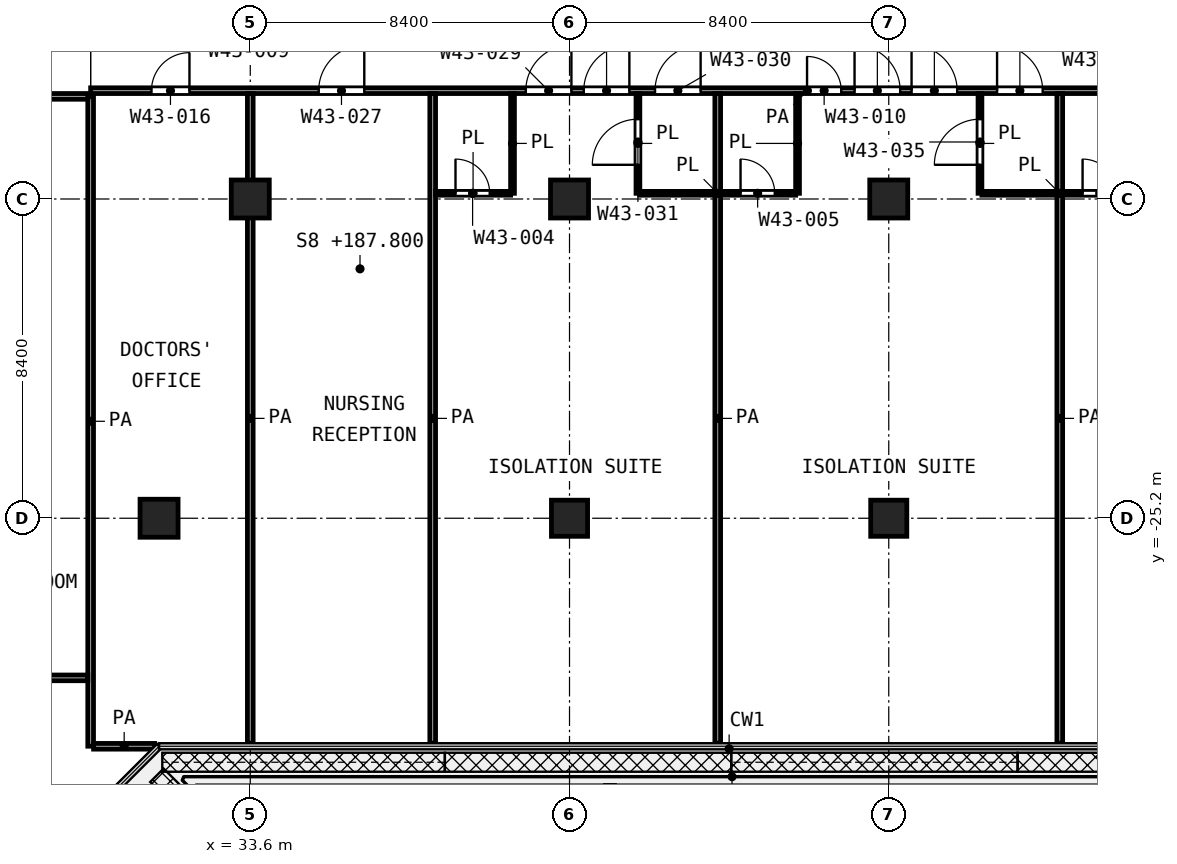
"""IFC4 building model, lengths in metres.
Left out: names, types, materials, properties, quantities, classifications, styles, units other than length and angle.
Written with IfcOpenShell. Run it as: python <this file> out.ifc"""

import sys

from ifc_helpers import new_model, si_unit, direction, frame, frame_2d, origin, origin_2d, place, context, subcontext, project, spatial, rectangle, extrude, element, fill, save


model = new_model("IFC4")
c1 = context("Model", 3, precision=1e-05, world=origin(), true_north=direction((0.0, 1.0)))
c2 = subcontext(c1, "Body", "Model", "MODEL_VIEW")
j1 = project(units=[si_unit("LENGTHUNIT", "METRE"), si_unit("PLANEANGLEUNIT", "RADIAN")], contexts=[c1])
p1 = place(None, origin())
s1 = spatial("IfcSite", under=j1, at=p1, CompositionType="ELEMENT")
p2 = place(p1, origin())
s2 = spatial("IfcBuilding", under=s1, at=p2, CompositionType="ELEMENT")
p3 = place(p2, frame((0.0, 0.0, 187.8)))
s3 = spatial("IfcBuildingStorey", under=s2, at=p3, CompositionType="ELEMENT", Elevation=187.8)
for number, where, z_axis, x_axis in (
    (1, (33.6, -16.8, 0.0), (0.0, 0.0, 1.0), (1.0, 0.0, 0.0)),
    (2, (42.0, -16.8, 0.0), (0.0, 0.0, 1.0), (1.0, 0.0, 0.0)),
    (3, (50.4, -16.8, 0.0), (0.0, 0.0, 1.0), (1.0, 0.0, 0.0)),
    (4, (31.2, -25.2, 0.0), (0.0, 0.0, 1.0), (1.0, 0.0, 0.0)),
):
    element("IfcColumn", number, at=place(p3, frame(where, z_axis=z_axis, x_axis=x_axis)), inside=s3, PredefinedType="COLUMN", context=c2, shape_type="SweptSolid", body=[
        extrude(rectangle(XDim=1.0, YDim=1.0, at=origin_2d()), origin(), (0.0, 0.0, 1.0), 4.2),
    ])
for number, where, z_axis, x_axis in (
    (5, (42.0, -25.2, 0.0), (0.0, 0.0, 1.0), (1.0, 0.0, 0.0)),
    (6, (50.4, -25.2, 0.0), (0.0, 0.0, 1.0), (1.0, 0.0, 0.0)),
):
    element("IfcColumn", number, at=place(p3, frame(where, z_axis=z_axis, x_axis=x_axis)), inside=s3, PredefinedType="COLUMN", context=c2, shape_type="SweptSolid", body=[
        extrude(rectangle(XDim=0.95, YDim=0.95, at=origin_2d()), origin(), (0.0, 0.0, 1.0), 4.2),
    ])
p4 = place(p3, frame((38.475, -16.65, 0.0), z_axis=(0.0, 0.0, 1.0), x_axis=(1.0, 0.0, 0.0)))
e7 = element("IfcWall", 7, at=p4, inside=s3, PredefinedType="PARTITIONING", context=c2, shape_type="SweptSolid", body=[
    extrude(rectangle(XDim=1.975, YDim=0.1, at=frame_2d((0.987, 0.0))), origin(), (0.0, 0.0, 1.0), 3.6),
])
p5 = place(p4, frame((0.525, 0.0, 0.0)))
e8 = element("IfcOpeningElement", 8, at=p5, cuts=e7, PredefinedType="OPENING", context=c2, shape_type="SweptSolid", body=[
    extrude(rectangle(XDim=0.9, YDim=2.1, at=frame_2d((0.45, 1.05))), frame((0.0, 0.06, 0.0), z_axis=(0.0, -1.0, 0.0), x_axis=(1.0, 0.0, 0.0)), (0.0, 0.0, 1.0), 0.12),
])
p6 = place(p3, frame((43.85, -16.65, 0.0), z_axis=(0.0, 0.0, 1.0), x_axis=(1.0, 0.0, 0.0)))
e9 = element("IfcWall", 9, at=p6, inside=s3, PredefinedType="PARTITIONING", context=c2, shape_type="SweptSolid", body=[
    extrude(rectangle(XDim=4.1, YDim=0.1, at=frame_2d((2.05, 0.0))), origin(), (0.0, 0.0, 1.0), 3.6),
])
p7 = place(p6, frame((2.65, 0.0, 0.0)))
e10 = element("IfcOpeningElement", 10, at=p7, cuts=e9, PredefinedType="OPENING", context=c2, shape_type="SweptSolid", body=[
    extrude(rectangle(XDim=0.9, YDim=2.1, at=frame_2d((0.45, 1.05))), frame((0.0, 0.06, 0.0), z_axis=(0.0, -1.0, 0.0), x_axis=(1.0, 0.0, 0.0)), (0.0, 0.0, 1.0), 0.12),
])
p8 = place(p3, frame((52.85, -16.65, 0.0), z_axis=(0.0, 0.0, 1.0), x_axis=(1.0, 0.0, 0.0)))
e11 = element("IfcWall", 11, at=p8, inside=s3, PredefinedType="PARTITIONING", context=c2, shape_type="SweptSolid", body=[
    extrude(rectangle(XDim=4.1, YDim=0.1, at=frame_2d((2.05, 0.0))), origin(), (0.0, 0.0, 1.0), 3.6),
])
p9 = place(p8, frame((2.65, 0.0, 0.0)))
e12 = element("IfcOpeningElement", 12, at=p9, cuts=e11, PredefinedType="OPENING", context=c2, shape_type="SweptSolid", body=[
    extrude(rectangle(XDim=0.9, YDim=2.1, at=frame_2d((0.45, 1.05))), frame((0.0, 0.06, 0.0), z_axis=(0.0, -1.0, 0.0), x_axis=(1.0, 0.0, 0.0)), (0.0, 0.0, 1.0), 0.12),
])
p10 = place(p3, frame((40.5, -16.65, 0.0), z_axis=(0.0, 0.0, 1.0), x_axis=(0.0, 1.0, 0.0)))
e13 = element("IfcWall", 13, at=p10, inside=s3, PredefinedType="PARTITIONING", context=c2, shape_type="SweptSolid", body=[
    extrude(rectangle(XDim=2.625, YDim=0.1, at=frame_2d((1.312, 0.0))), origin(), (0.0, 0.0, 1.0), 3.6),
])
p11 = place(p3, frame((43.8, -16.65, 0.0), z_axis=(0.0, 0.0, 1.0), x_axis=(0.0, 1.0, 0.0)))
e14 = element("IfcWall", 14, at=p11, inside=s3, PredefinedType="PARTITIONING", context=c2, shape_type="SweptSolid", body=[
    extrude(rectangle(XDim=2.625, YDim=0.1, at=frame_2d((1.312, 0.0))), origin(), (0.0, 0.0, 1.0), 3.6),
])
p12 = place(p11, frame((0.75, 0.0, 0.0)))
e15 = element("IfcOpeningElement", 15, at=p12, cuts=e14, PredefinedType="OPENING", context=c2, shape_type="SweptSolid", body=[
    extrude(rectangle(XDim=1.2, YDim=2.1, at=frame_2d((0.6, 1.05))), frame((0.0, 0.06, 0.0), z_axis=(0.0, -1.0, 0.0), x_axis=(1.0, 0.0, 0.0)), (0.0, 0.0, 1.0), 0.12),
])
p13 = place(p3, frame((48.0, -16.65, 0.0), z_axis=(0.0, 0.0, 1.0), x_axis=(0.0, 1.0, 0.0)))
e16 = element("IfcWall", 16, at=p13, inside=s3, PredefinedType="PARTITIONING", context=c2, shape_type="SweptSolid", body=[
    extrude(rectangle(XDim=2.625, YDim=0.1, at=frame_2d((1.312, 0.0))), origin(), (0.0, 0.0, 1.0), 3.6),
])
p14 = place(p3, frame((52.8, -16.65, 0.0), z_axis=(0.0, 0.0, 1.0), x_axis=(0.0, 1.0, 0.0)))
e17 = element("IfcWall", 17, at=p14, inside=s3, PredefinedType="PARTITIONING", context=c2, shape_type="SweptSolid", body=[
    extrude(rectangle(XDim=2.625, YDim=0.1, at=frame_2d((1.312, 0.0))), origin(), (0.0, 0.0, 1.0), 3.6),
])
p15 = place(p14, frame((0.75, 0.0, 0.0)))
e18 = element("IfcOpeningElement", 18, at=p15, cuts=e17, PredefinedType="OPENING", context=c2, shape_type="SweptSolid", body=[
    extrude(rectangle(XDim=1.2, YDim=2.1, at=frame_2d((0.6, 1.05))), frame((0.0, 0.06, 0.0), z_axis=(0.0, -1.0, 0.0), x_axis=(1.0, 0.0, 0.0)), (0.0, 0.0, 1.0), 0.12),
])
p16 = place(p3, frame((29.477, -31.2, 0.0), z_axis=(0.0, 0.0, 1.0), x_axis=(1.0, 0.0, 0.0)))
e19 = element("IfcWall", 19, at=p16, inside=s3, PredefinedType="PARTITIONING", context=c2, shape_type="SweptSolid", body=[
    extrude(rectangle(XDim=1.61, YDim=0.15, at=frame_2d((0.805, 0.0))), origin(), (0.0, 0.0, 1.0), 3.6),
])
p17 = place(p3, frame((14.175, -29.4, 0.0), z_axis=(0.0, 0.0, 1.0), x_axis=(1.0, 0.0, 0.0)))
e20 = element("IfcWall", 20, at=p17, inside=s3, PredefinedType="PARTITIONING", context=c2, shape_type="SweptSolid", body=[
    extrude(rectangle(XDim=15.15, YDim=0.15, at=frame_2d((7.575, 0.0))), origin(), (0.0, 0.0, 1.0), 3.6),
])
p18 = place(p3, frame((24.9, -14.1, 0.0), z_axis=(0.0, 0.0, 1.0), x_axis=(1.0, 0.0, 0.0)))
e21 = element("IfcWall", 21, at=p18, inside=s3, PredefinedType="PARTITIONING", context=c2, shape_type="SweptSolid", body=[
    extrude(rectangle(XDim=4.425, YDim=0.15, at=frame_2d((2.212, 0.0))), origin(), (0.0, 0.0, 1.0), 3.6),
])
p19 = place(p18, frame((1.65, 0.0, 0.0)))
e22 = element("IfcOpeningElement", 22, at=p19, cuts=e21, PredefinedType="OPENING", context=c2, shape_type="SweptSolid", body=[
    extrude(rectangle(XDim=1.5, YDim=2.1, at=frame_2d((0.75, 1.05))), frame((0.0, 0.085, 0.0), z_axis=(0.0, -1.0, 0.0), x_axis=(1.0, 0.0, 0.0)), (0.0, 0.0, 1.0), 0.17),
])
p20 = place(p3, frame((29.4, -13.95, 0.0), z_axis=(0.0, 0.0, 1.0), x_axis=(1.0, 0.0, 0.0)))
e23 = element("IfcWall", 23, at=p20, inside=s3, PredefinedType="PARTITIONING", context=c2, shape_type="SweptSolid", body=[
    extrude(rectangle(XDim=37.72, YDim=0.15, at=frame_2d((18.86, 0.0))), origin(), (0.0, 0.0, 1.0), 3.6),
])
p21 = place(p20, frame((1.6, 0.0, 0.0)))
e24 = element("IfcOpeningElement", 24, at=p21, cuts=e23, PredefinedType="OPENING", context=c2, shape_type="SweptSolid", body=[
    extrude(rectangle(XDim=1.0, YDim=2.1, at=frame_2d((0.5, 1.05))), frame((0.0, 0.085, 0.0), z_axis=(0.0, -1.0, 0.0), x_axis=(1.0, 0.0, 0.0)), (0.0, 0.0, 1.0), 0.17),
])
p22 = place(p20, frame((6.0, 0.0, 0.0)))
e25 = element("IfcOpeningElement", 25, at=p22, cuts=e23, PredefinedType="OPENING", context=c2, shape_type="SweptSolid", body=[
    extrude(rectangle(XDim=1.2, YDim=2.1, at=frame_2d((0.6, 1.05))), frame((0.0, 0.085, 0.0), z_axis=(0.0, -1.0, 0.0), x_axis=(1.0, 0.0, 0.0)), (0.0, 0.0, 1.0), 0.17),
])
p23 = place(p20, frame((12.975, 0.0, 0.0)))
e26 = element("IfcOpeningElement", 26, at=p23, cuts=e23, PredefinedType="OPENING", context=c2, shape_type="SweptSolid", body=[
    extrude(rectangle(XDim=1.2, YDim=2.1, at=frame_2d((0.6, 1.05))), frame((0.0, 0.085, 0.0), z_axis=(0.0, -1.0, 0.0), x_axis=(1.0, 0.0, 0.0)), (0.0, 0.0, 1.0), 0.17),
])
p24 = place(p20, frame((11.45, 0.0, 0.0)))
e27 = element("IfcOpeningElement", 27, at=p24, cuts=e23, PredefinedType="OPENING", context=c2, shape_type="SweptSolid", body=[
    extrude(rectangle(XDim=1.2, YDim=2.1, at=frame_2d((0.6, 1.05))), frame((0.0, 0.085, 0.0), z_axis=(0.0, -1.0, 0.0), x_axis=(1.0, 0.0, 0.0)), (0.0, 0.0, 1.0), 0.17),
])
p25 = place(p20, frame((14.85, 0.0, 0.0)))
e28 = element("IfcOpeningElement", 28, at=p25, cuts=e23, PredefinedType="OPENING", context=c2, shape_type="SweptSolid", body=[
    extrude(rectangle(XDim=1.2, YDim=2.1, at=frame_2d((0.6, 1.05))), frame((0.0, 0.085, 0.0), z_axis=(0.0, -1.0, 0.0), x_axis=(1.0, 0.0, 0.0)), (0.0, 0.0, 1.0), 0.17),
])
p26 = place(p20, frame((21.6, 0.0, 0.0)))
e29 = element("IfcOpeningElement", 29, at=p26, cuts=e23, PredefinedType="OPENING", context=c2, shape_type="SweptSolid", body=[
    extrude(rectangle(XDim=1.2, YDim=2.1, at=frame_2d((0.6, 1.05))), frame((0.0, 0.085, 0.0), z_axis=(0.0, -1.0, 0.0), x_axis=(1.0, 0.0, 0.0)), (0.0, 0.0, 1.0), 0.17),
])
p27 = place(p20, frame((20.1, 0.0, 0.0)))
e30 = element("IfcOpeningElement", 30, at=p27, cuts=e23, PredefinedType="OPENING", context=c2, shape_type="SweptSolid", body=[
    extrude(rectangle(XDim=1.2, YDim=2.1, at=frame_2d((0.6, 1.05))), frame((0.0, 0.085, 0.0), z_axis=(0.0, -1.0, 0.0), x_axis=(1.0, 0.0, 0.0)), (0.0, 0.0, 1.0), 0.17),
])
p28 = place(p20, frame((18.85, 0.0, 0.0)))
e31 = element("IfcOpeningElement", 31, at=p28, cuts=e23, PredefinedType="OPENING", context=c2, shape_type="SweptSolid", body=[
    extrude(rectangle(XDim=0.9, YDim=2.1, at=frame_2d((0.45, 1.05))), frame((0.0, 0.085, 0.0), z_axis=(0.0, -1.0, 0.0), x_axis=(1.0, 0.0, 0.0)), (0.0, 0.0, 1.0), 0.17),
])
p29 = place(p20, frame((23.85, 0.0, 0.0)))
e32 = element("IfcOpeningElement", 32, at=p29, cuts=e23, PredefinedType="OPENING", context=c2, shape_type="SweptSolid", body=[
    extrude(rectangle(XDim=1.2, YDim=2.1, at=frame_2d((0.6, 1.05))), frame((0.0, 0.085, 0.0), z_axis=(0.0, -1.0, 0.0), x_axis=(1.0, 0.0, 0.0)), (0.0, 0.0, 1.0), 0.17),
])
p30 = place(p20, frame((29.475, 0.0, 0.0)))
e33 = element("IfcOpeningElement", 33, at=p30, cuts=e23, PredefinedType="OPENING", context=c2, shape_type="SweptSolid", body=[
    extrude(rectangle(XDim=1.2, YDim=2.1, at=frame_2d((0.6, 1.05))), frame((0.0, 0.085, 0.0), z_axis=(0.0, -1.0, 0.0), x_axis=(1.0, 0.0, 0.0)), (0.0, 0.0, 1.0), 0.17),
])
p31 = place(p20, frame((27.95, 0.0, 0.0)))
e34 = element("IfcOpeningElement", 34, at=p31, cuts=e23, PredefinedType="OPENING", context=c2, shape_type="SweptSolid", body=[
    extrude(rectangle(XDim=1.2, YDim=2.1, at=frame_2d((0.6, 1.05))), frame((0.0, 0.085, 0.0), z_axis=(0.0, -1.0, 0.0), x_axis=(1.0, 0.0, 0.0)), (0.0, 0.0, 1.0), 0.17),
])
p32 = place(p20, frame((31.35, 0.0, 0.0)))
e35 = element("IfcOpeningElement", 35, at=p32, cuts=e23, PredefinedType="OPENING", context=c2, shape_type="SweptSolid", body=[
    extrude(rectangle(XDim=1.2, YDim=2.1, at=frame_2d((0.6, 1.05))), frame((0.0, 0.085, 0.0), z_axis=(0.0, -1.0, 0.0), x_axis=(1.0, 0.0, 0.0)), (0.0, 0.0, 1.0), 0.17),
])
p33 = place(p20, frame((34.9, 0.0, 0.0)))
e36 = element("IfcOpeningElement", 36, at=p33, cuts=e23, PredefinedType="OPENING", context=c2, shape_type="SweptSolid", body=[
    extrude(rectangle(XDim=1.0, YDim=2.1, at=frame_2d((0.5, 1.05))), frame((0.0, 0.085, 0.0), z_axis=(0.0, -1.0, 0.0), x_axis=(1.0, 0.0, 0.0)), (0.0, 0.0, 1.0), 0.17),
])
p34 = place(p3, frame((29.4, -31.198, 0.0), z_axis=(0.0, 0.0, 1.0), x_axis=(0.0, 1.0, 0.0)))
e37 = element("IfcWall", 37, at=p34, inside=s3, PredefinedType="PARTITIONING", context=c2, shape_type="SweptSolid", body=[
    extrude(rectangle(XDim=17.098, YDim=0.15, at=frame_2d((8.549, 0.0))), origin(), (0.0, 0.0, 1.0), 3.6),
])
for number, where, z_axis, x_axis in (
    (38, (33.6, -31.12, 0.0), (0.0, 0.0, 1.0), (0.0, 1.0, 0.0)),
    (39, (38.4, -31.12, 0.0), (0.0, 0.0, 1.0), (0.0, 1.0, 0.0)),
    (40, (45.9, -31.12, 0.0), (0.0, 0.0, 1.0), (0.0, 1.0, 0.0)),
    (41, (54.9, -31.12, 0.0), (0.0, 0.0, 1.0), (0.0, 1.0, 0.0)),
):
    element("IfcWall", number, at=place(p3, frame(where, z_axis=z_axis, x_axis=x_axis)), inside=s3, PredefinedType="PARTITIONING", context=c2, shape_type="SweptSolid", body=[
        extrude(rectangle(XDim=17.095, YDim=0.15, at=frame_2d((8.548, 0.0))), origin(), (0.0, 0.0, 1.0), 3.6),
    ])
p35 = place(p21, origin())
e42 = element("IfcDoor", 42, at=p35, inside=s3, OperationType="SINGLE_SWING_RIGHT", PredefinedType="DOOR", context=c2, shape_type="SweptSolid", body=[
    extrude(rectangle(XDim=1.0, YDim=2.1, at=frame_2d((0.5, 1.05))), frame((0.0, 0.025, 0.0), z_axis=(0.0, -1.0, 0.0), x_axis=(1.0, 0.0, 0.0)), (0.0, 0.0, 1.0), 0.05),
])
fill(e24, e42)
p36 = place(p22, origin())
e43 = element("IfcDoor", 43, at=p36, inside=s3, OperationType="SINGLE_SWING_RIGHT", PredefinedType="DOOR", context=c2, shape_type="SweptSolid", body=[
    extrude(rectangle(XDim=1.2, YDim=2.1, at=frame_2d((0.6, 1.05))), frame((0.0, 0.025, 0.0), z_axis=(0.0, -1.0, 0.0), x_axis=(1.0, 0.0, 0.0)), (0.0, 0.0, 1.0), 0.05),
])
fill(e25, e43)
p37 = place(p23, origin())
e44 = element("IfcDoor", 44, at=p37, inside=s3, OperationType="SINGLE_SWING_RIGHT", PredefinedType="DOOR", context=c2, shape_type="SweptSolid", body=[
    extrude(rectangle(XDim=1.2, YDim=2.1, at=frame_2d((0.6, 1.05))), frame((0.0, 0.025, 0.0), z_axis=(0.0, -1.0, 0.0), x_axis=(1.0, 0.0, 0.0)), (0.0, 0.0, 1.0), 0.05),
])
fill(e26, e44)
p38 = place(p24, origin())
e45 = element("IfcDoor", 45, at=p38, inside=s3, OperationType="SINGLE_SWING_RIGHT", PredefinedType="DOOR", context=c2, shape_type="SweptSolid", body=[
    extrude(rectangle(XDim=1.2, YDim=2.1, at=frame_2d((0.6, 1.05))), frame((0.0, 0.025, 0.0), z_axis=(0.0, -1.0, 0.0), x_axis=(1.0, 0.0, 0.0)), (0.0, 0.0, 1.0), 0.05),
])
fill(e27, e45)
p39 = place(p25, origin())
e46 = element("IfcDoor", 46, at=p39, inside=s3, OperationType="SINGLE_SWING_RIGHT", PredefinedType="DOOR", context=c2, shape_type="SweptSolid", body=[
    extrude(rectangle(XDim=1.2, YDim=2.1, at=frame_2d((0.6, 1.05))), frame((0.0, 0.025, 0.0), z_axis=(0.0, -1.0, 0.0), x_axis=(1.0, 0.0, 0.0)), (0.0, 0.0, 1.0), 0.05),
])
fill(e28, e46)
p40 = place(p12, origin())
e47 = element("IfcDoor", 47, at=p40, inside=s3, OperationType="SINGLE_SWING_LEFT", PredefinedType="DOOR", context=c2, shape_type="SweptSolid", body=[
    extrude(rectangle(XDim=1.2, YDim=2.1, at=frame_2d((0.6, 1.05))), frame((0.0, 0.025, 0.0), z_axis=(0.0, -1.0, 0.0), x_axis=(1.0, 0.0, 0.0)), (0.0, 0.0, 1.0), 0.05),
])
fill(e15, e47)
p41 = place(p5, origin())
e48 = element("IfcDoor", 48, at=p41, inside=s3, OperationType="SINGLE_SWING_LEFT", PredefinedType="DOOR", context=c2, shape_type="SweptSolid", body=[
    extrude(rectangle(XDim=0.9, YDim=2.1, at=frame_2d((0.45, 1.05))), frame((0.0, 0.025, 0.0), z_axis=(0.0, -1.0, 0.0), x_axis=(1.0, 0.0, 0.0)), (0.0, 0.0, 1.0), 0.05),
])
fill(e8, e48)
p42 = place(p26, origin())
e49 = element("IfcDoor", 49, at=p42, inside=s3, OperationType="SINGLE_SWING_LEFT", PredefinedType="DOOR", context=c2, shape_type="SweptSolid", body=[
    extrude(rectangle(XDim=1.2, YDim=2.1, at=frame_2d((0.6, 1.05))), frame((0.0, 0.025, 0.0), z_axis=(0.0, -1.0, 0.0), x_axis=(1.0, 0.0, 0.0)), (0.0, 0.0, 1.0), 0.05),
])
fill(e29, e49)
p43 = place(p27, origin())
e50 = element("IfcDoor", 50, at=p43, inside=s3, OperationType="SINGLE_SWING_LEFT", PredefinedType="DOOR", context=c2, shape_type="SweptSolid", body=[
    extrude(rectangle(XDim=1.2, YDim=2.1, at=frame_2d((0.6, 1.05))), frame((0.0, 0.025, 0.0), z_axis=(0.0, -1.0, 0.0), x_axis=(1.0, 0.0, 0.0)), (0.0, 0.0, 1.0), 0.05),
])
fill(e30, e50)
p44 = place(p28, origin())
e51 = element("IfcDoor", 51, at=p44, inside=s3, OperationType="SINGLE_SWING_LEFT", PredefinedType="DOOR", context=c2, shape_type="SweptSolid", body=[
    extrude(rectangle(XDim=0.9, YDim=2.1, at=frame_2d((0.45, 1.05))), frame((0.0, 0.025, 0.0), z_axis=(0.0, -1.0, 0.0), x_axis=(1.0, 0.0, 0.0)), (0.0, 0.0, 1.0), 0.05),
])
fill(e31, e51)
p45 = place(p29, origin())
e52 = element("IfcDoor", 52, at=p45, inside=s3, OperationType="SINGLE_SWING_LEFT", PredefinedType="DOOR", context=c2, shape_type="SweptSolid", body=[
    extrude(rectangle(XDim=1.2, YDim=2.1, at=frame_2d((0.6, 1.05))), frame((0.0, 0.025, 0.0), z_axis=(0.0, -1.0, 0.0), x_axis=(1.0, 0.0, 0.0)), (0.0, 0.0, 1.0), 0.05),
])
fill(e32, e52)
p46 = place(p15, origin())
e53 = element("IfcDoor", 53, at=p46, inside=s3, OperationType="SINGLE_SWING_LEFT", PredefinedType="DOOR", context=c2, shape_type="SweptSolid", body=[
    extrude(rectangle(XDim=1.2, YDim=2.1, at=frame_2d((0.6, 1.05))), frame((0.0, 0.025, 0.0), z_axis=(0.0, -1.0, 0.0), x_axis=(1.0, 0.0, 0.0)), (0.0, 0.0, 1.0), 0.05),
])
fill(e18, e53)
p47 = place(p7, origin())
e54 = element("IfcDoor", 54, at=p47, inside=s3, OperationType="SINGLE_SWING_LEFT", PredefinedType="DOOR", context=c2, shape_type="SweptSolid", body=[
    extrude(rectangle(XDim=0.9, YDim=2.1, at=frame_2d((0.45, 1.05))), frame((0.0, 0.025, 0.0), z_axis=(0.0, -1.0, 0.0), x_axis=(1.0, 0.0, 0.0)), (0.0, 0.0, 1.0), 0.05),
])
fill(e10, e54)
p48 = place(p9, origin())
e55 = element("IfcDoor", 55, at=p48, inside=s3, OperationType="SINGLE_SWING_LEFT", PredefinedType="DOOR", context=c2, shape_type="SweptSolid", body=[
    extrude(rectangle(XDim=0.9, YDim=2.1, at=frame_2d((0.45, 1.05))), frame((0.0, 0.025, 0.0), z_axis=(0.0, -1.0, 0.0), x_axis=(1.0, 0.0, 0.0)), (0.0, 0.0, 1.0), 0.05),
])
fill(e12, e55)
save(model, sys.argv[1])
